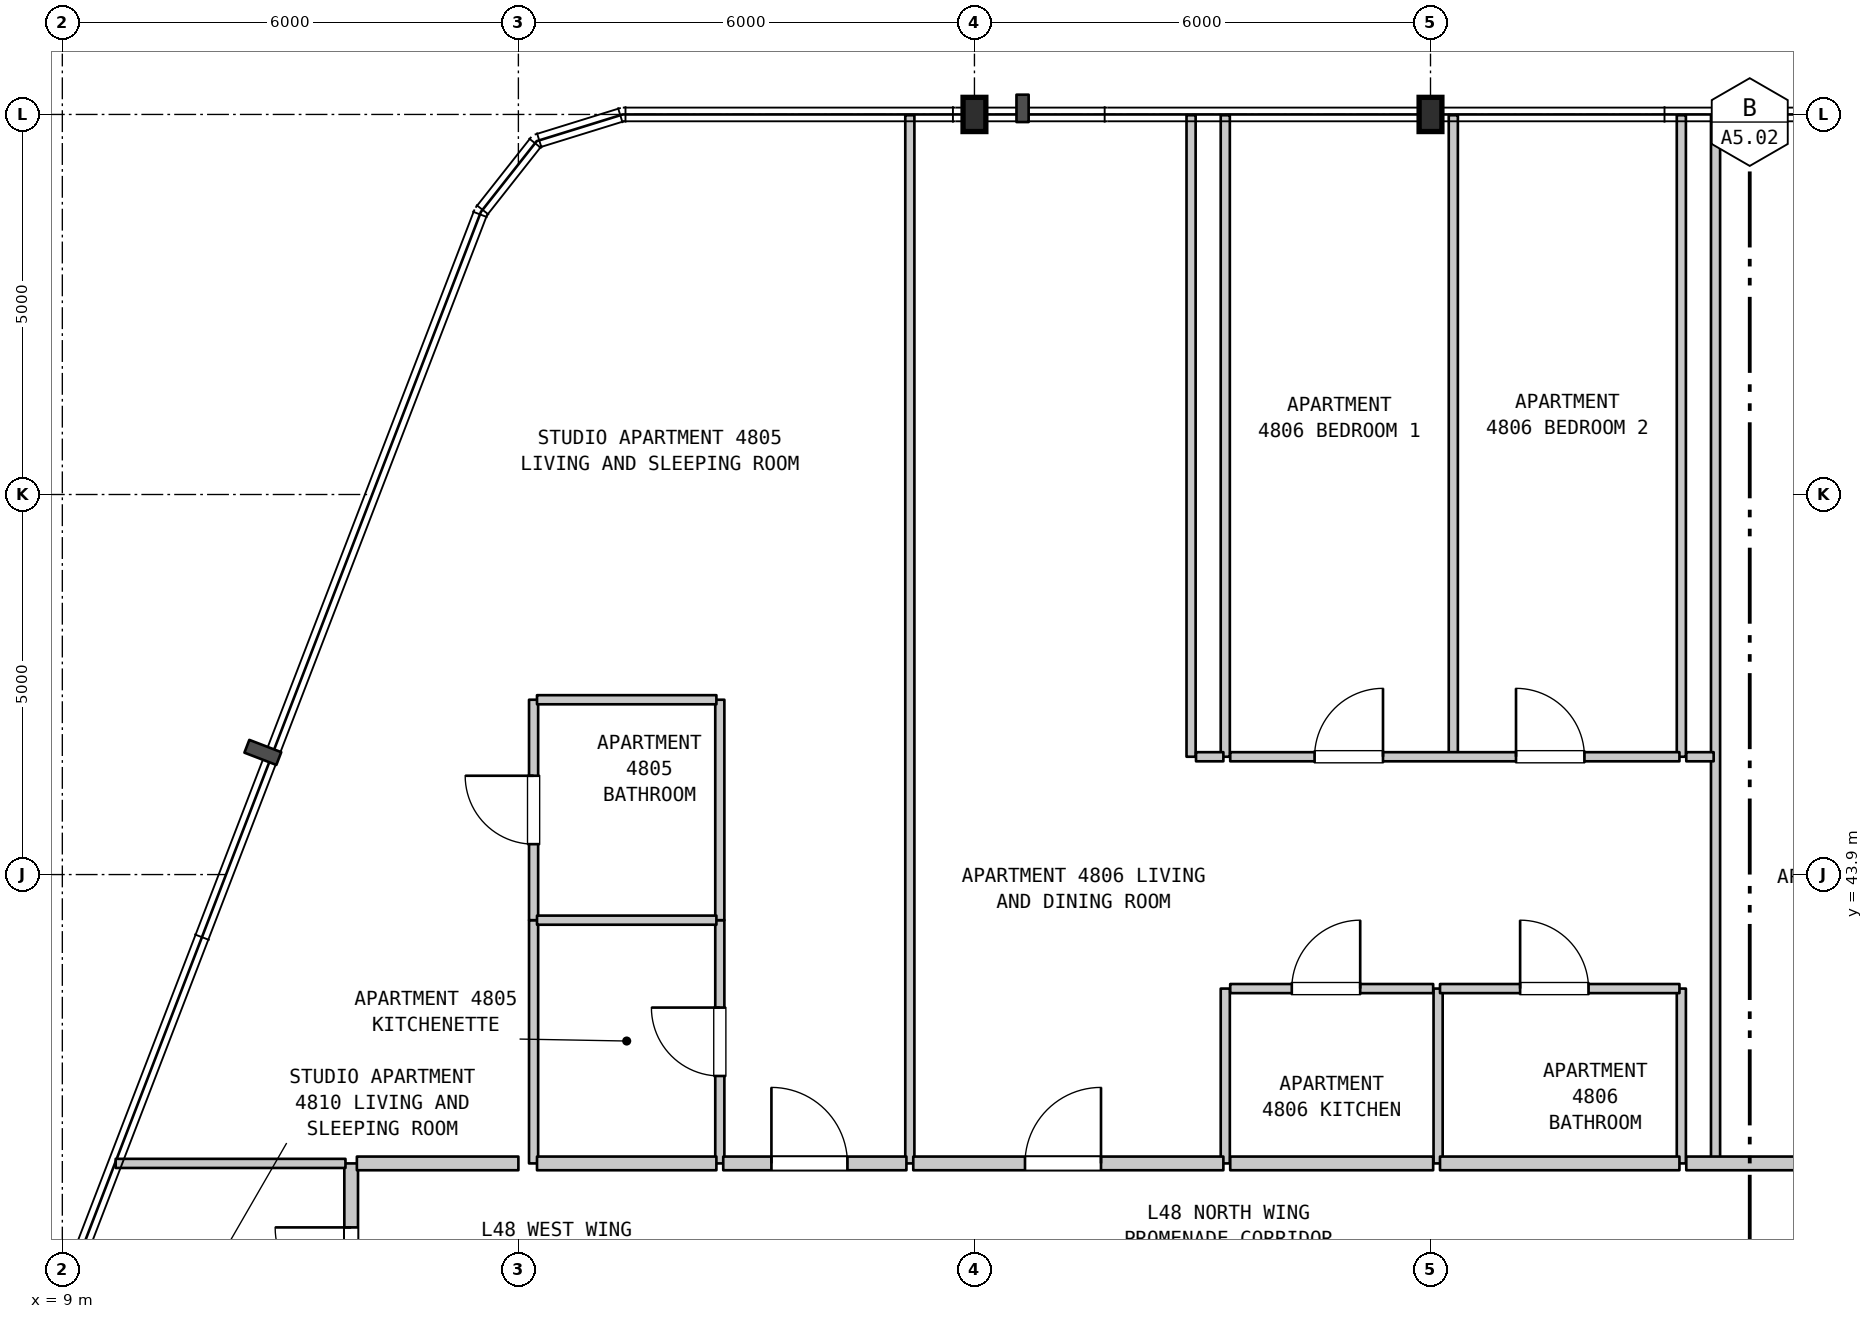
"""IFC4 building model, lengths in metres.
Left out: names, types, materials, properties, quantities, classifications, styles, units other than length and angle.
Written with IfcOpenShell. Run it as: python <this file> out.ifc"""

import sys

from ifc_helpers import new_model, si_unit, direction, frame, frame_2d, origin, origin_2d, place, context, subcontext, project, spatial, rectangle, i_section, extrude, element, fill, save


model = new_model("IFC4")
c1 = context("Model", 3, precision=1e-05, world=origin(), true_north=direction((0.0, 1.0)))
c2 = subcontext(c1, "Body", "Model", "MODEL_VIEW")
j1 = project(units=[si_unit("LENGTHUNIT", "METRE"), si_unit("PLANEANGLEUNIT", "RADIAN")], contexts=[c1])
p1 = place(None, origin())
s1 = spatial("IfcSite", under=j1, at=p1, CompositionType="ELEMENT")
p2 = place(p1, origin())
s2 = spatial("IfcBuilding", under=s1, at=p2, CompositionType="ELEMENT")
p3 = place(p2, frame((0.0, 0.0, 195.8)))
s3 = spatial("IfcBuildingStorey", under=s2, at=p3, CompositionType="ELEMENT", Elevation=195.8)
for number, where, z_axis, x_axis in (
    (1, (21.0, 53.9, 0.0), (0.0, 0.0, 1.0), (1.0, 0.0, 0.0)),
    (2, (27.0, 53.9, 0.0), (0.0, 0.0, 1.0), (1.0, 0.0, 0.0)),
):
    element("IfcColumn", number, at=place(p3, frame(where, z_axis=z_axis, x_axis=x_axis)), inside=s3, PredefinedType="COLUMN", context=c2, shape_type="SweptSolid", body=[
        extrude(i_section(OverallWidth=0.3, OverallDepth=0.45, WebThickness=0.014, FlangeThickness=0.026, FilletRadius=0.027, at=origin_2d()), origin(), (0.0, 0.0, 1.0), 3.7),
    ])
p4 = place(p3, frame((12.8, 37.416, 0.0), z_axis=(0.0, 0.0, 1.0), x_axis=(0.0, 1.0, 0.0)))
e3 = element("IfcWall", 3, at=p4, inside=s3, PredefinedType="STANDARD", context=c2, shape_type="SweptSolid", body=[
    extrude(rectangle(XDim=2.684, YDim=0.18, at=frame_2d((1.342, 0.0))), origin(), (0.0, 0.0, 1.0), 3.39),
])
p5 = place(p4, frame((0.842, 0.0, 0.0)))
e4 = element("IfcOpeningElement", 4, at=p5, cuts=e3, PredefinedType="OPENING", context=c2, shape_type="SweptSolid", body=[
    extrude(rectangle(XDim=1.0, YDim=2.15, at=frame_2d((0.5, 1.075))), frame((0.0, 0.1, 0.0), z_axis=(0.0, -1.0, 0.0), x_axis=(1.0, 0.0, 0.0)), (0.0, 0.0, 1.0), 0.2),
])
p6 = place(p3, frame((15.2, 40.1, 0.0), z_axis=(0.0, 0.0, 1.0), x_axis=(0.0, 1.0, 0.0)))
e5 = element("IfcWall", 5, at=p6, inside=s3, PredefinedType="PARTITIONING", context=c2, shape_type="SweptSolid", body=[
    extrude(rectangle(XDim=3.2, YDim=0.12, at=frame_2d((1.6, 0.0))), origin(), (0.0, 0.0, 1.0), 3.39),
])
p7 = place(p3, frame((15.2, 43.3, 0.0), z_axis=(0.0, 0.0, 1.0), x_axis=(0.0, 1.0, 0.0)))
e6 = element("IfcWall", 6, at=p7, inside=s3, PredefinedType="PARTITIONING", context=c2, shape_type="SweptSolid", body=[
    extrude(rectangle(XDim=2.9, YDim=0.12, at=frame_2d((1.45, 0.0))), origin(), (0.0, 0.0, 1.0), 3.39),
])
p8 = place(p7, frame((1.0, 0.0, 0.0)))
e7 = element("IfcOpeningElement", 7, at=p8, cuts=e6, PredefinedType="OPENING", context=c2, shape_type="SweptSolid", body=[
    extrude(rectangle(XDim=0.9, YDim=2.1, at=frame_2d((0.45, 1.05))), frame((0.0, 0.07, 0.0), z_axis=(0.0, -1.0, 0.0), x_axis=(1.0, 0.0, 0.0)), (0.0, 0.0, 1.0), 0.14),
])
p9 = place(p3, frame((17.65, 40.1, 0.0), z_axis=(0.0, 0.0, 1.0), x_axis=(0.0, 1.0, 0.0)))
e8 = element("IfcWall", 8, at=p9, inside=s3, PredefinedType="PARTITIONING", context=c2, shape_type="SweptSolid", body=[
    extrude(rectangle(XDim=3.2, YDim=0.12, at=frame_2d((1.6, 0.0))), origin(), (0.0, 0.0, 1.0), 3.39),
])
p10 = place(p9, frame((1.15, 0.0, 0.0)))
e9 = element("IfcOpeningElement", 9, at=p10, cuts=e8, PredefinedType="OPENING", context=c2, shape_type="SweptSolid", body=[
    extrude(rectangle(XDim=0.9, YDim=2.15, at=frame_2d((0.45, 1.075))), frame((0.0, 0.07, 0.0), z_axis=(0.0, -1.0, 0.0), x_axis=(1.0, 0.0, 0.0)), (0.0, 0.0, 1.0), 0.14),
])
p11 = place(p3, frame((17.65, 43.3, 0.0), z_axis=(0.0, 0.0, 1.0), x_axis=(0.0, 1.0, 0.0)))
e10 = element("IfcWall", 10, at=p11, inside=s3, PredefinedType="PARTITIONING", context=c2, shape_type="SweptSolid", body=[
    extrude(rectangle(XDim=2.9, YDim=0.12, at=frame_2d((1.45, 0.0))), origin(), (0.0, 0.0, 1.0), 3.39),
])
p12 = place(p3, frame((20.15, 40.1, 0.0), z_axis=(0.0, 0.0, 1.0), x_axis=(0.0, 1.0, 0.0)))
e11 = element("IfcWall", 11, at=p12, inside=s3, PredefinedType="PARTITIONING", context=c2, shape_type="SweptSolid", body=[
    extrude(rectangle(XDim=13.79, YDim=0.12, at=frame_2d((6.895, 0.0))), origin(), (0.0, 0.0, 1.0), 3.39),
])
p13 = place(p3, frame((23.85, 45.45, 0.0), z_axis=(0.0, 0.0, 1.0), x_axis=(0.0, 1.0, 0.0)))
e12 = element("IfcWall", 12, at=p13, inside=s3, PredefinedType="PARTITIONING", context=c2, shape_type="SweptSolid", body=[
    extrude(rectangle(XDim=8.44, YDim=0.12, at=frame_2d((4.22, 0.0))), origin(), (0.0, 0.0, 1.0), 3.39),
])
p14 = place(p3, frame((24.3, 40.1, 0.0), z_axis=(0.0, 0.0, 1.0), x_axis=(0.0, 1.0, 0.0)))
e13 = element("IfcWall", 13, at=p14, inside=s3, PredefinedType="PARTITIONING", context=c2, shape_type="SweptSolid", body=[
    extrude(rectangle(XDim=2.3, YDim=0.12, at=frame_2d((1.15, 0.0))), origin(), (0.0, 0.0, 1.0), 3.39),
])
p15 = place(p3, frame((24.3, 45.45, 0.0), z_axis=(0.0, 0.0, 1.0), x_axis=(0.0, 1.0, 0.0)))
e14 = element("IfcWall", 14, at=p15, inside=s3, PredefinedType="PARTITIONING", context=c2, shape_type="SweptSolid", body=[
    extrude(rectangle(XDim=8.44, YDim=0.12, at=frame_2d((4.22, 0.0))), origin(), (0.0, 0.0, 1.0), 3.39),
])
p16 = place(p3, frame((27.1, 40.1, 0.0), z_axis=(0.0, 0.0, 1.0), x_axis=(0.0, 1.0, 0.0)))
e15 = element("IfcWall", 15, at=p16, inside=s3, PredefinedType="PARTITIONING", context=c2, shape_type="SweptSolid", body=[
    extrude(rectangle(XDim=2.3, YDim=0.12, at=frame_2d((1.15, 0.0))), origin(), (0.0, 0.0, 1.0), 3.39),
])
p17 = place(p3, frame((27.3, 45.45, 0.0), z_axis=(0.0, 0.0, 1.0), x_axis=(0.0, 1.0, 0.0)))
e16 = element("IfcWall", 16, at=p17, inside=s3, PredefinedType="PARTITIONING", context=c2, shape_type="SweptSolid", body=[
    extrude(rectangle(XDim=8.44, YDim=0.12, at=frame_2d((4.22, 0.0))), origin(), (0.0, 0.0, 1.0), 3.39),
])
p18 = place(p3, frame((30.3, 40.1, 0.0), z_axis=(0.0, 0.0, 1.0), x_axis=(0.0, 1.0, 0.0)))
e17 = element("IfcWall", 17, at=p18, inside=s3, PredefinedType="PARTITIONING", context=c2, shape_type="SweptSolid", body=[
    extrude(rectangle(XDim=2.3, YDim=0.12, at=frame_2d((1.15, 0.0))), origin(), (0.0, 0.0, 1.0), 3.39),
])
p19 = place(p3, frame((30.3, 45.45, 0.0), z_axis=(0.0, 0.0, 1.0), x_axis=(0.0, 1.0, 0.0)))
e18 = element("IfcWall", 18, at=p19, inside=s3, PredefinedType="PARTITIONING", context=c2, shape_type="SweptSolid", body=[
    extrude(rectangle(XDim=8.44, YDim=0.12, at=frame_2d((4.22, 0.0))), origin(), (0.0, 0.0, 1.0), 3.39),
])
p20 = place(p3, frame((30.75, 40.1, 0.0), z_axis=(0.0, 0.0, 1.0), x_axis=(0.0, 1.0, 0.0)))
e19 = element("IfcWall", 19, at=p20, inside=s3, PredefinedType="PARTITIONING", context=c2, shape_type="SweptSolid", body=[
    extrude(rectangle(XDim=13.79, YDim=0.12, at=frame_2d((6.895, 0.0))), origin(), (0.0, 0.0, 1.0), 3.39),
])
p21 = place(p3, frame((9.702, 40.1, 0.0), z_axis=(0.0, 0.0, 1.0), x_axis=(1.0, 0.0, 0.0)))
e20 = element("IfcWall", 20, at=p21, inside=s3, PredefinedType="PARTITIONING", context=c2, shape_type="SweptSolid", body=[
    extrude(rectangle(XDim=3.023, YDim=0.12, at=frame_2d((1.512, 0.0))), origin(), (0.0, 0.0, 1.0), 3.39),
])
p22 = place(p3, frame((12.875, 40.1, 0.0), z_axis=(0.0, 0.0, 1.0), x_axis=(1.0, 0.0, 0.0)))
e21 = element("IfcWall", 21, at=p22, inside=s3, PredefinedType="STANDARD", context=c2, shape_type="SweptSolid", body=[
    extrude(rectangle(XDim=2.125, YDim=0.18, at=frame_2d((1.062, 0.0))), origin(), (0.0, 0.0, 1.0), 3.39),
])
p23 = place(p3, frame((15.245, 40.1, 0.0), z_axis=(0.0, 0.0, 1.0), x_axis=(1.0, 0.0, 0.0)))
e22 = element("IfcWall", 22, at=p23, inside=s3, PredefinedType="STANDARD", context=c2, shape_type="SweptSolid", body=[
    extrude(rectangle(XDim=2.36, YDim=0.18, at=frame_2d((1.18, 0.0))), origin(), (0.0, 0.0, 1.0), 3.39),
])
p24 = place(p3, frame((17.695, 40.1, 0.0), z_axis=(0.0, 0.0, 1.0), x_axis=(1.0, 0.0, 0.0)))
e23 = element("IfcWall", 23, at=p24, inside=s3, PredefinedType="STANDARD", context=c2, shape_type="SweptSolid", body=[
    extrude(rectangle(XDim=2.41, YDim=0.18, at=frame_2d((1.205, 0.0))), origin(), (0.0, 0.0, 1.0), 3.39),
])
p25 = place(p24, frame((0.634, 0.0, 0.0)))
e24 = element("IfcOpeningElement", 24, at=p25, cuts=e23, PredefinedType="OPENING", context=c2, shape_type="SweptSolid", body=[
    extrude(rectangle(XDim=1.0, YDim=2.15, at=frame_2d((0.5, 1.075))), frame((0.0, 0.1, 0.0), z_axis=(0.0, -1.0, 0.0), x_axis=(1.0, 0.0, 0.0)), (0.0, 0.0, 1.0), 0.2),
])
p26 = place(p3, frame((20.195, 40.1, 0.0), z_axis=(0.0, 0.0, 1.0), x_axis=(1.0, 0.0, 0.0)))
e25 = element("IfcWall", 25, at=p26, inside=s3, PredefinedType="STANDARD", context=c2, shape_type="SweptSolid", body=[
    extrude(rectangle(XDim=4.08, YDim=0.18, at=frame_2d((2.04, 0.0))), origin(), (0.0, 0.0, 1.0), 3.39),
])
p27 = place(p26, frame((1.47, 0.0, 0.0)))
e26 = element("IfcOpeningElement", 26, at=p27, cuts=e25, PredefinedType="OPENING", context=c2, shape_type="SweptSolid", body=[
    extrude(rectangle(XDim=1.0, YDim=2.15, at=frame_2d((0.5, 1.075))), frame((0.0, 0.1, 0.0), z_axis=(0.0, -1.0, 0.0), x_axis=(1.0, 0.0, 0.0)), (0.0, 0.0, 1.0), 0.2),
])
p28 = place(p3, frame((24.365, 40.1, 0.0), z_axis=(0.0, 0.0, 1.0), x_axis=(1.0, 0.0, 0.0)))
e27 = element("IfcWall", 27, at=p28, inside=s3, PredefinedType="STANDARD", context=c2, shape_type="SweptSolid", body=[
    extrude(rectangle(XDim=2.67, YDim=0.18, at=frame_2d((1.335, 0.0))), origin(), (0.0, 0.0, 1.0), 3.39),
])
p29 = place(p3, frame((27.125, 40.1, 0.0), z_axis=(0.0, 0.0, 1.0), x_axis=(1.0, 0.0, 0.0)))
e28 = element("IfcWall", 28, at=p29, inside=s3, PredefinedType="STANDARD", context=c2, shape_type="SweptSolid", body=[
    extrude(rectangle(XDim=3.15, YDim=0.18, at=frame_2d((1.575, 0.0))), origin(), (0.0, 0.0, 1.0), 3.39),
])
p30 = place(p3, frame((30.365, 40.1, 0.0), z_axis=(0.0, 0.0, 1.0), x_axis=(1.0, 0.0, 0.0)))
e29 = element("IfcWall", 29, at=p30, inside=s3, PredefinedType="STANDARD", context=c2, shape_type="SweptSolid", body=[
    extrude(rectangle(XDim=4.75, YDim=0.18, at=frame_2d((2.375, 0.0))), origin(), (0.0, 0.0, 1.0), 3.39),
])
p31 = place(p30, frame((2.075, 0.0, 0.0)))
e30 = element("IfcOpeningElement", 30, at=p31, cuts=e29, PredefinedType="OPENING", context=c2, shape_type="SweptSolid", body=[
    extrude(rectangle(XDim=1.0, YDim=2.15, at=frame_2d((0.5, 1.075))), frame((0.0, 0.1, 0.0), z_axis=(0.0, -1.0, 0.0), x_axis=(1.0, 0.0, 0.0)), (0.0, 0.0, 1.0), 0.2),
])
p32 = place(p3, frame((24.365, 42.4, 0.0), z_axis=(0.0, 0.0, 1.0), x_axis=(1.0, 0.0, 0.0)))
e31 = element("IfcWall", 31, at=p32, inside=s3, PredefinedType="PARTITIONING", context=c2, shape_type="SweptSolid", body=[
    extrude(rectangle(XDim=2.67, YDim=0.12, at=frame_2d((1.335, 0.0))), origin(), (0.0, 0.0, 1.0), 3.39),
])
p33 = place(p32, frame((0.81, 0.0, 0.0)))
e32 = element("IfcOpeningElement", 32, at=p33, cuts=e31, PredefinedType="OPENING", context=c2, shape_type="SweptSolid", body=[
    extrude(rectangle(XDim=0.9, YDim=2.15, at=frame_2d((0.45, 1.075))), frame((0.0, 0.07, 0.0), z_axis=(0.0, -1.0, 0.0), x_axis=(1.0, 0.0, 0.0)), (0.0, 0.0, 1.0), 0.14),
])
p34 = place(p3, frame((27.125, 42.4, 0.0), z_axis=(0.0, 0.0, 1.0), x_axis=(1.0, 0.0, 0.0)))
e33 = element("IfcWall", 33, at=p34, inside=s3, PredefinedType="PARTITIONING", context=c2, shape_type="SweptSolid", body=[
    extrude(rectangle(XDim=3.15, YDim=0.12, at=frame_2d((1.575, 0.0))), origin(), (0.0, 0.0, 1.0), 3.39),
])
p35 = place(p34, frame((1.054, 0.0, 0.0)))
e34 = element("IfcOpeningElement", 34, at=p35, cuts=e33, PredefinedType="OPENING", context=c2, shape_type="SweptSolid", body=[
    extrude(rectangle(XDim=0.9, YDim=2.1, at=frame_2d((0.45, 1.05))), frame((0.0, 0.07, 0.0), z_axis=(0.0, -1.0, 0.0), x_axis=(1.0, 0.0, 0.0)), (0.0, 0.0, 1.0), 0.14),
])
p36 = place(p3, frame((15.245, 43.3, 0.0), z_axis=(0.0, 0.0, 1.0), x_axis=(1.0, 0.0, 0.0)))
e35 = element("IfcWall", 35, at=p36, inside=s3, PredefinedType="PARTITIONING", context=c2, shape_type="SweptSolid", body=[
    extrude(rectangle(XDim=2.36, YDim=0.12, at=frame_2d((1.18, 0.0))), origin(), (0.0, 0.0, 1.0), 3.39),
])
p37 = place(p3, frame((23.915, 45.45, 0.0), z_axis=(0.0, 0.0, 1.0), x_axis=(1.0, 0.0, 0.0)))
e36 = element("IfcWall", 36, at=p37, inside=s3, PredefinedType="PARTITIONING", context=c2, shape_type="SweptSolid", body=[
    extrude(rectangle(XDim=0.36, YDim=0.12, at=frame_2d((0.18, 0.0))), origin(), (0.0, 0.0, 1.0), 3.39),
])
p38 = place(p3, frame((24.365, 45.45, 0.0), z_axis=(0.0, 0.0, 1.0), x_axis=(1.0, 0.0, 0.0)))
e37 = element("IfcWall", 37, at=p38, inside=s3, PredefinedType="PARTITIONING", context=c2, shape_type="SweptSolid", body=[
    extrude(rectangle(XDim=5.91, YDim=0.12, at=frame_2d((2.955, 0.0))), origin(), (0.0, 0.0, 1.0), 3.39),
])
p39 = place(p38, frame((1.11, 0.0, 0.0)))
e38 = element("IfcOpeningElement", 38, at=p39, cuts=e37, PredefinedType="OPENING", context=c2, shape_type="SweptSolid", body=[
    extrude(rectangle(XDim=0.9, YDim=2.15, at=frame_2d((0.45, 1.075))), frame((0.0, 0.07, 0.0), z_axis=(0.0, -1.0, 0.0), x_axis=(1.0, 0.0, 0.0)), (0.0, 0.0, 1.0), 0.14),
])
p40 = place(p38, frame((3.76, 0.0, 0.0)))
e39 = element("IfcOpeningElement", 39, at=p40, cuts=e37, PredefinedType="OPENING", context=c2, shape_type="SweptSolid", body=[
    extrude(rectangle(XDim=0.9, YDim=2.15, at=frame_2d((0.45, 1.075))), frame((0.0, 0.07, 0.0), z_axis=(0.0, -1.0, 0.0), x_axis=(1.0, 0.0, 0.0)), (0.0, 0.0, 1.0), 0.14),
])
p41 = place(p3, frame((30.365, 45.45, 0.0), z_axis=(0.0, 0.0, 1.0), x_axis=(1.0, 0.0, 0.0)))
e40 = element("IfcWall", 40, at=p41, inside=s3, PredefinedType="PARTITIONING", context=c2, shape_type="SweptSolid", body=[
    extrude(rectangle(XDim=0.36, YDim=0.12, at=frame_2d((0.18, 0.0))), origin(), (0.0, 0.0, 1.0), 3.39),
])
p42 = place(p3, frame((15.245, 46.2, 0.0), z_axis=(0.0, 0.0, 1.0), x_axis=(1.0, 0.0, 0.0)))
e41 = element("IfcWall", 41, at=p42, inside=s3, PredefinedType="PARTITIONING", context=c2, shape_type="SweptSolid", body=[
    extrude(rectangle(XDim=2.36, YDim=0.12, at=frame_2d((1.18, 0.0))), origin(), (0.0, 0.0, 1.0), 3.39),
])
p43 = place(p5, origin())
e42 = element("IfcDoor", 42, at=p43, inside=s3, OperationType="SINGLE_SWING_RIGHT", PredefinedType="DOOR", context=c2, shape_type="SweptSolid", body=[
    extrude(rectangle(XDim=1.0, YDim=2.15, at=frame_2d((0.5, 1.075))), frame((0.0, 0.025, 0.0), z_axis=(0.0, -1.0, 0.0), x_axis=(1.0, 0.0, 0.0)), (0.0, 0.0, 1.0), 0.05),
])
fill(e4, e42)
p44 = place(p8, origin())
e43 = element("IfcDoor", 43, at=p44, inside=s3, OperationType="SINGLE_SWING_RIGHT", PredefinedType="DOOR", context=c2, shape_type="SweptSolid", body=[
    extrude(rectangle(XDim=0.9, YDim=2.1, at=frame_2d((0.45, 1.05))), frame((0.0, 0.025, 0.0), z_axis=(0.0, -1.0, 0.0), x_axis=(1.0, 0.0, 0.0)), (0.0, 0.0, 1.0), 0.05),
])
fill(e7, e43)
p45 = place(p10, origin())
e44 = element("IfcDoor", 44, at=p45, inside=s3, OperationType="SINGLE_SWING_RIGHT", PredefinedType="DOOR", context=c2, shape_type="SweptSolid", body=[
    extrude(rectangle(XDim=0.9, YDim=2.15, at=frame_2d((0.45, 1.075))), frame((0.0, 0.025, 0.0), z_axis=(0.0, -1.0, 0.0), x_axis=(1.0, 0.0, 0.0)), (0.0, 0.0, 1.0), 0.05),
])
fill(e9, e44)
p46 = place(p25, origin())
e45 = element("IfcDoor", 45, at=p46, inside=s3, OperationType="SINGLE_SWING_LEFT", PredefinedType="DOOR", context=c2, shape_type="SweptSolid", body=[
    extrude(rectangle(XDim=1.0, YDim=2.15, at=frame_2d((0.5, 1.075))), frame((0.0, 0.025, 0.0), z_axis=(0.0, -1.0, 0.0), x_axis=(1.0, 0.0, 0.0)), (0.0, 0.0, 1.0), 0.05),
])
fill(e24, e45)
p47 = place(p27, origin())
e46 = element("IfcDoor", 46, at=p47, inside=s3, OperationType="SINGLE_SWING_RIGHT", PredefinedType="DOOR", context=c2, shape_type="SweptSolid", body=[
    extrude(rectangle(XDim=1.0, YDim=2.15, at=frame_2d((0.5, 1.075))), frame((0.0, 0.025, 0.0), z_axis=(0.0, -1.0, 0.0), x_axis=(1.0, 0.0, 0.0)), (0.0, 0.0, 1.0), 0.05),
])
fill(e26, e46)
p48 = place(p33, origin())
e47 = element("IfcDoor", 47, at=p48, inside=s3, OperationType="SINGLE_SWING_RIGHT", PredefinedType="DOOR", context=c2, shape_type="SweptSolid", body=[
    extrude(rectangle(XDim=0.9, YDim=2.15, at=frame_2d((0.45, 1.075))), frame((0.0, 0.025, 0.0), z_axis=(0.0, -1.0, 0.0), x_axis=(1.0, 0.0, 0.0)), (0.0, 0.0, 1.0), 0.05),
])
fill(e32, e47)
p49 = place(p35, origin())
e48 = element("IfcDoor", 48, at=p49, inside=s3, OperationType="SINGLE_SWING_LEFT", PredefinedType="DOOR", context=c2, shape_type="SweptSolid", body=[
    extrude(rectangle(XDim=0.9, YDim=2.1, at=frame_2d((0.45, 1.05))), frame((0.0, 0.025, 0.0), z_axis=(0.0, -1.0, 0.0), x_axis=(1.0, 0.0, 0.0)), (0.0, 0.0, 1.0), 0.05),
])
fill(e34, e48)
p50 = place(p39, origin())
e49 = element("IfcDoor", 49, at=p50, inside=s3, OperationType="SINGLE_SWING_RIGHT", PredefinedType="DOOR", context=c2, shape_type="SweptSolid", body=[
    extrude(rectangle(XDim=0.9, YDim=2.15, at=frame_2d((0.45, 1.075))), frame((0.0, 0.025, 0.0), z_axis=(0.0, -1.0, 0.0), x_axis=(1.0, 0.0, 0.0)), (0.0, 0.0, 1.0), 0.05),
])
fill(e38, e49)
p51 = place(p40, origin())
e50 = element("IfcDoor", 50, at=p51, inside=s3, OperationType="SINGLE_SWING_LEFT", PredefinedType="DOOR", context=c2, shape_type="SweptSolid", body=[
    extrude(rectangle(XDim=0.9, YDim=2.15, at=frame_2d((0.45, 1.075))), frame((0.0, 0.025, 0.0), z_axis=(0.0, -1.0, 0.0), x_axis=(1.0, 0.0, 0.0)), (0.0, 0.0, 1.0), 0.05),
])
fill(e39, e50)
save(model, sys.argv[1])
